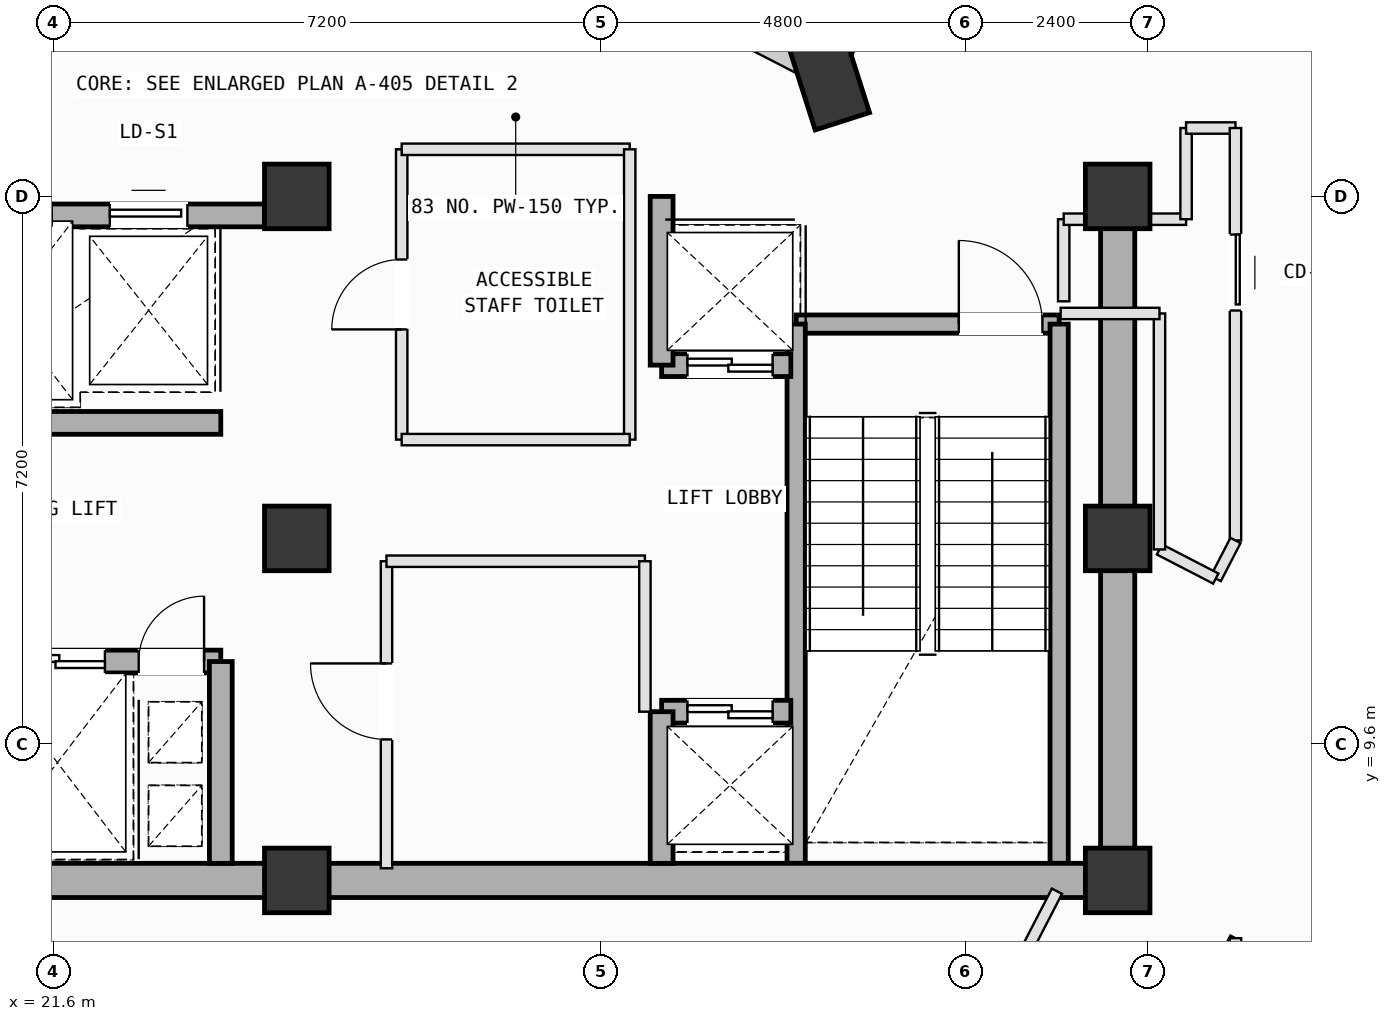
"""IFC4 building model, lengths in metres.
Left out: names, types, materials, properties, quantities, classifications, styles, units other than length and angle.
Written with IfcOpenShell. Run it as: python <this file> out.ifc"""

import sys

from ifc_helpers import new_model, si_unit, direction, frame, frame_2d, origin, origin_2d, place, context, subcontext, project, spatial, rectangle, extrude, element, fill, save


model = new_model("IFC4")
c1 = context("Model", 3, precision=1e-05, world=origin(), true_north=direction((0.0, 1.0)))
c2 = subcontext(c1, "Body", "Model", "MODEL_VIEW")
j1 = project(units=[si_unit("LENGTHUNIT", "METRE"), si_unit("PLANEANGLEUNIT", "RADIAN")], contexts=[c1])
p1 = place(None, origin())
s1 = spatial("IfcSite", under=j1, at=p1, CompositionType="ELEMENT")
p2 = place(p1, origin())
s2 = spatial("IfcBuilding", under=s1, at=p2, CompositionType="ELEMENT")
p3 = place(p2, frame((0.0, 0.0, 292.6)))
s3 = spatial("IfcBuildingStorey", under=s2, at=p3, CompositionType="ELEMENT", Elevation=292.6)
for number, where, z_axis, x_axis in (
    (1, (24.8, 7.8, 0.0), (0.0, 0.0, 1.0), (1.0, 0.0, 0.0)),
    (2, (24.8, 12.3, 0.0), (0.0, 0.0, 1.0), (1.0, 0.0, 0.0)),
    (3, (24.8, 16.8, 0.0), (0.0, 0.0, 1.0), (1.0, 0.0, 0.0)),
    (4, (35.6, 7.8, 0.0), (0.0, 0.0, 1.0), (1.0, 0.0, 0.0)),
    (5, (35.6, 12.3, 0.0), (0.0, 0.0, 1.0), (1.0, 0.0, 0.0)),
    (6, (35.6, 16.8, 0.0), (0.0, 0.0, 1.0), (1.0, 0.0, 0.0)),
):
    element("IfcColumn", number, at=place(p3, frame(where, z_axis=z_axis, x_axis=x_axis)), inside=s3, PredefinedType="COLUMN", context=c2, shape_type="SweptSolid", body=[
        extrude(rectangle(XDim=0.85, YDim=0.85, at=origin_2d()), origin(), (0.0, 0.0, 1.0), 4.0),
    ])
p4 = place(p3, frame((31.795, 18.36, 0.002), z_axis=(0.026747615739, -0.007267046285, 0.999615803742), x_axis=(-0.998694834125, -0.043719525929, 0.026405138601)))
e7 = element("IfcColumn", 7, at=p4, inside=s3, PredefinedType="COLUMN", context=c2, shape_type="SweptSolid", body=[
    extrude(rectangle(XDim=1.2, YDim=0.75, at=origin_2d()), origin(), (0.0, 0.0, 1.0), 3.998),
])
p5 = place(p3, frame((31.981, 18.721, 0.0), z_axis=(0.0, 0.0, 1.0), x_axis=(0.458658067714, 0.888612838598, 0.0)))
e8 = element("IfcWall", 8, at=p5, inside=s3, PredefinedType="SOLIDWALL", context=c2, shape_type="SweptSolid", body=[
    extrude(rectangle(XDim=6.158, YDim=0.28, at=frame_2d((3.079, 0.0))), origin(), (0.0, 0.0, 1.0), 3.265),
])
p6 = place(p5, frame((3.741, 0.0, 0.75)))
e9 = element("IfcOpeningElement", 9, at=p6, cuts=e8, PredefinedType="OPENING", context=c2, shape_type="SweptSolid", body=[
    extrude(rectangle(XDim=1.6, YDim=1.95, at=frame_2d((0.8, 0.975))), frame((0.0, 0.15, 0.0), z_axis=(0.0, -1.0, 0.0), x_axis=(1.0, 0.0, 0.0)), (0.0, 0.0, 1.0), 0.3),
])
p7 = place(p3, frame((25.308, 21.709, 0.0), z_axis=(0.0, 0.0, 1.0), x_axis=(0.888620195741, -0.458643813565, 0.0)))
e10 = element("IfcWall", 10, at=p7, inside=s3, PredefinedType="SOLIDWALL", context=c2, shape_type="SweptSolid", body=[
    extrude(rectangle(XDim=6.958, YDim=0.28, at=frame_2d((3.479, 0.0))), origin(), (0.0, 0.0, 1.0), 3.165),
])
p8 = place(p3, frame((31.37, 15.12, 0.0), z_axis=(0.0, 0.0, 1.0), x_axis=(1.0, 0.0, 0.0)))
e11 = element("IfcWall", 11, at=p8, inside=s3, PredefinedType="SOLIDWALL", context=c2, shape_type="SweptSolid", body=[
    extrude(rectangle(XDim=3.46, YDim=0.24, at=frame_2d((1.73, 0.0))), origin(), (0.0, 0.0, 1.0), 3.78),
])
p9 = place(p8, frame((2.14, 0.0, 0.0)))
e12 = element("IfcOpeningElement", 12, at=p9, cuts=e11, PredefinedType="OPENING", context=c2, shape_type="SweptSolid", body=[
    extrude(rectangle(XDim=1.1, YDim=2.15, at=frame_2d((0.55, 1.075))), frame((0.0, 0.13, 0.0), z_axis=(0.0, -1.0, 0.0), x_axis=(1.0, 0.0, 0.0)), (0.0, 0.0, 1.0), 0.26),
])
for number, where, z_axis, x_axis in (
    (13, (34.83, 15.12, 0.0), (0.0, 0.0, 1.0), (0.0, -1.0, 0.0)),
    (14, (31.37, 8.025, 0.0), (0.0, 0.0, 1.0), (0.0, 1.0, 0.0)),
):
    element("IfcWall", number, at=place(p3, frame(where, z_axis=z_axis, x_axis=x_axis)), inside=s3, PredefinedType="SOLIDWALL", context=c2, shape_type="SweptSolid", body=[
        extrude(rectangle(XDim=7.095, YDim=0.24, at=frame_2d((3.548, 0.0))), origin(), (0.0, 0.0, 1.0), 3.78),
    ])
for number, where, z_axis, x_axis in (
    (15, (14.0, 7.8, 0.0), (0.0, 0.0, 1.0), (1.0, 0.0, 0.0)),
    (16, (24.8, 7.8, 0.0), (0.0, 0.0, 1.0), (1.0, 0.0, 0.0)),
):
    element("IfcWall", number, at=place(p3, frame(where, z_axis=z_axis, x_axis=x_axis)), inside=s3, PredefinedType="SHEAR", context=c2, shape_type="SweptSolid", body=[
        extrude(rectangle(XDim=10.8, YDim=0.45, at=frame_2d((5.4, 0.0))), origin(), (0.0, 0.0, 1.0), 3.78),
    ])
p10 = place(p3, frame((35.6, 7.8, 0.0), z_axis=(0.0, 0.0, 1.0), x_axis=(0.0, 1.0, 0.0)))
e17 = element("IfcWall", 17, at=p10, inside=s3, PredefinedType="SHEAR", context=c2, shape_type="SweptSolid", body=[
    extrude(rectangle(XDim=9.0, YDim=0.45, at=frame_2d((4.5, 0.0))), origin(), (0.0, 0.0, 1.0), 3.78),
])
p11 = place(p3, frame((19.85, 16.55, 0.0), z_axis=(0.0, 0.0, 1.0), x_axis=(1.0, 0.0, 0.0)))
e18 = element("IfcWall", 18, at=p11, inside=s3, PredefinedType="SOLIDWALL", context=c2, shape_type="SweptSolid", body=[
    extrude(rectangle(XDim=4.525, YDim=0.3, at=frame_2d((2.262, 0.0))), origin(), (0.0, 0.0, 1.0), 3.78),
])
p12 = place(p11, frame((0.475, 0.0, 0.0)))
e19 = element("IfcOpeningElement", 19, at=p12, cuts=e18, PredefinedType="OPENING", context=c2, shape_type="SweptSolid", body=[
    extrude(rectangle(XDim=1.25, YDim=2.18, at=frame_2d((0.625, 1.09))), frame((0.0, 0.16, 0.0), z_axis=(0.0, -1.0, 0.0), x_axis=(1.0, 0.0, 0.0)), (0.0, 0.0, 1.0), 0.32),
])
p13 = place(p11, frame((2.49, 0.0, 0.0)))
e20 = element("IfcOpeningElement", 20, at=p13, cuts=e18, PredefinedType="OPENING", context=c2, shape_type="SweptSolid", body=[
    extrude(rectangle(XDim=1.02, YDim=2.12, at=frame_2d((0.51, 1.06))), frame((0.0, 0.16, 0.0), z_axis=(0.0, -1.0, 0.0), x_axis=(1.0, 0.0, 0.0)), (0.0, 0.0, 1.0), 0.32),
])
p14 = place(p3, frame((18.5, 10.68, 0.0), z_axis=(0.0, 0.0, 1.0), x_axis=(1.0, 0.0, 0.0)))
e21 = element("IfcWall", 21, at=p14, inside=s3, PredefinedType="SOLIDWALL", context=c2, shape_type="SweptSolid", body=[
    extrude(rectangle(XDim=5.3, YDim=0.3, at=frame_2d((2.65, 0.0))), origin(), (0.0, 0.0, 1.0), 3.78),
])
p15 = place(p14, frame((4.22, 0.0, 0.0)))
e22 = element("IfcOpeningElement", 22, at=p15, cuts=e21, PredefinedType="OPENING", context=c2, shape_type="SweptSolid", body=[
    extrude(rectangle(XDim=0.86, YDim=2.06, at=frame_2d((0.43, 1.03))), frame((0.0, 0.16, 0.0), z_axis=(0.0, -1.0, 0.0), x_axis=(1.0, 0.0, 0.0)), (0.0, 0.0, 1.0), 0.32),
])
p16 = place(p14, frame((0.425, 0.0, 0.0)))
e23 = element("IfcOpeningElement", 23, at=p16, cuts=e21, PredefinedType="OPENING", context=c2, shape_type="SweptSolid", body=[
    extrude(rectangle(XDim=1.25, YDim=2.18, at=frame_2d((0.625, 1.09))), frame((0.0, 0.16, 0.0), z_axis=(0.0, -1.0, 0.0), x_axis=(1.0, 0.0, 0.0)), (0.0, 0.0, 1.0), 0.32),
])
p17 = place(p14, frame((2.525, 0.0, 0.0)))
e24 = element("IfcOpeningElement", 24, at=p17, cuts=e21, PredefinedType="OPENING", context=c2, shape_type="SweptSolid", body=[
    extrude(rectangle(XDim=1.25, YDim=2.18, at=frame_2d((0.625, 1.09))), frame((0.0, 0.16, 0.0), z_axis=(0.0, -1.0, 0.0), x_axis=(1.0, 0.0, 0.0)), (0.0, 0.0, 1.0), 0.32),
])
p18 = place(p3, frame((18.5, 13.82, 0.0), z_axis=(0.0, 0.0, 1.0), x_axis=(1.0, 0.0, 0.0)))
e25 = element("IfcWall", 25, at=p18, inside=s3, PredefinedType="SOLIDWALL", context=c2, shape_type="SweptSolid", body=[
    extrude(rectangle(XDim=5.3, YDim=0.3, at=frame_2d((2.65, 0.0))), origin(), (0.0, 0.0, 1.0), 3.78),
])
p19 = place(p18, frame((0.18, 0.0, 0.0)))
e26 = element("IfcOpeningElement", 26, at=p19, cuts=e25, PredefinedType="OPENING", context=c2, shape_type="SweptSolid", body=[
    extrude(rectangle(XDim=1.1, YDim=2.15, at=frame_2d((0.55, 1.075))), frame((0.0, 0.16, 0.0), z_axis=(0.0, -1.0, 0.0), x_axis=(1.0, 0.0, 0.0)), (0.0, 0.0, 1.0), 0.32),
])
p20 = place(p3, frame((23.8, 8.025, 0.0), z_axis=(0.0, 0.0, 1.0), x_axis=(0.0, 1.0, 0.0)))
e27 = element("IfcWall", 27, at=p20, inside=s3, PredefinedType="SOLIDWALL", context=c2, shape_type="SweptSolid", body=[
    extrude(rectangle(XDim=2.655, YDim=0.3, at=frame_2d((1.328, 0.0))), origin(), (0.0, 0.0, 1.0), 3.78),
])
p21 = place(p3, frame((29.6, 10.02, 0.0), z_axis=(0.0, 0.0, 1.0), x_axis=(1.0, 0.0, 0.0)))
e28 = element("IfcWall", 28, at=p21, inside=s3, PredefinedType="SOLIDWALL", context=c2, shape_type="SweptSolid", body=[
    extrude(rectangle(XDim=1.7, YDim=0.3, at=frame_2d((0.85, 0.0))), origin(), (0.0, 0.0, 1.0), 3.78),
])
p22 = place(p21, frame((0.34, 0.0, 0.0)))
e29 = element("IfcOpeningElement", 29, at=p22, cuts=e28, PredefinedType="OPENING", context=c2, shape_type="SweptSolid", body=[
    extrude(rectangle(XDim=1.12, YDim=2.15, at=frame_2d((0.56, 1.075))), frame((0.0, 0.16, 0.0), z_axis=(0.0, -1.0, 0.0), x_axis=(1.0, 0.0, 0.0)), (0.0, 0.0, 1.0), 0.32),
])
p23 = place(p3, frame((29.6, 8.025, 0.0), z_axis=(0.0, 0.0, 1.0), x_axis=(0.0, 1.0, 0.0)))
e30 = element("IfcWall", 30, at=p23, inside=s3, PredefinedType="SOLIDWALL", context=c2, shape_type="SweptSolid", body=[
    extrude(rectangle(XDim=1.995, YDim=0.3, at=frame_2d((0.998, 0.0))), origin(), (0.0, 0.0, 1.0), 3.78),
])
p24 = place(p3, frame((29.6, 14.58, 0.0), z_axis=(0.0, 0.0, 1.0), x_axis=(1.0, 0.0, 0.0)))
e31 = element("IfcWall", 31, at=p24, inside=s3, PredefinedType="SOLIDWALL", context=c2, shape_type="SweptSolid", body=[
    extrude(rectangle(XDim=1.7, YDim=0.3, at=frame_2d((0.85, 0.0))), origin(), (0.0, 0.0, 1.0), 3.78),
])
p25 = place(p24, frame((0.34, 0.0, 0.0)))
e32 = element("IfcOpeningElement", 32, at=p25, cuts=e31, PredefinedType="OPENING", context=c2, shape_type="SweptSolid", body=[
    extrude(rectangle(XDim=1.12, YDim=2.15, at=frame_2d((0.56, 1.075))), frame((0.0, 0.16, 0.0), z_axis=(0.0, -1.0, 0.0), x_axis=(1.0, 0.0, 0.0)), (0.0, 0.0, 1.0), 0.32),
])
p26 = place(p3, frame((29.6, 14.58, 0.0), z_axis=(0.0, 0.0, 1.0), x_axis=(0.0, 1.0, 0.0)))
e33 = element("IfcWall", 33, at=p26, inside=s3, PredefinedType="SOLIDWALL", context=c2, shape_type="SweptSolid", body=[
    extrude(rectangle(XDim=2.22, YDim=0.3, at=frame_2d((1.11, 0.0))), origin(), (0.0, 0.0, 1.0), 3.78),
])
p27 = place(p3, frame((25.98, 7.96, 0.0), z_axis=(0.0, 0.0, 1.0), x_axis=(0.0, 1.0, 0.0)))
e34 = element("IfcWall", 34, at=p27, inside=s3, PredefinedType="PARTITIONING", context=c2, shape_type="SweptSolid", body=[
    extrude(rectangle(XDim=4.04, YDim=0.15, at=frame_2d((2.02, 0.0))), origin(), (0.0, 0.0, 1.0), 3.78),
])
p28 = place(p27, frame((1.695, 0.0, 0.0)))
e35 = element("IfcOpeningElement", 35, at=p28, cuts=e34, PredefinedType="OPENING", context=c2, shape_type="SweptSolid", body=[
    extrude(rectangle(XDim=1.0, YDim=2.12, at=frame_2d((0.5, 1.06))), frame((0.0, 0.085, 0.0), z_axis=(0.0, -1.0, 0.0), x_axis=(1.0, 0.0, 0.0)), (0.0, 0.0, 1.0), 0.17),
])
p29 = place(p3, frame((25.98, 12.0, 0.0), z_axis=(0.0, 0.0, 1.0), x_axis=(1.0, 0.0, 0.0)))
e36 = element("IfcWall", 36, at=p29, inside=s3, PredefinedType="PARTITIONING", context=c2, shape_type="SweptSolid", body=[
    extrude(rectangle(XDim=3.4, YDim=0.15, at=frame_2d((1.7, 0.0))), origin(), (0.0, 0.0, 1.0), 3.78),
])
p30 = place(p3, frame((29.38, 12.0, 0.0), z_axis=(0.0, 0.0, 1.0), x_axis=(0.0, -1.0, 0.0)))
e37 = element("IfcWall", 37, at=p30, inside=s3, PredefinedType="PARTITIONING", context=c2, shape_type="SweptSolid", body=[
    extrude(rectangle(XDim=1.98, YDim=0.15, at=frame_2d((0.99, 0.0))), origin(), (0.0, 0.0, 1.0), 3.78),
])
p31 = place(p3, frame((26.18, 13.6, 0.0), z_axis=(0.0, 0.0, 1.0), x_axis=(0.0, 1.0, 0.0)))
e38 = element("IfcWall", 38, at=p31, inside=s3, PredefinedType="PARTITIONING", context=c2, shape_type="SweptSolid", body=[
    extrude(rectangle(XDim=3.82, YDim=0.15, at=frame_2d((1.91, 0.0))), origin(), (0.0, 0.0, 1.0), 3.78),
])
p32 = place(p31, frame((1.45, 0.0, 0.0)))
e39 = element("IfcOpeningElement", 39, at=p32, cuts=e38, PredefinedType="OPENING", context=c2, shape_type="SweptSolid", body=[
    extrude(rectangle(XDim=0.92, YDim=2.1, at=frame_2d((0.46, 1.05))), frame((0.0, 0.085, 0.0), z_axis=(0.0, -1.0, 0.0), x_axis=(1.0, 0.0, 0.0)), (0.0, 0.0, 1.0), 0.17),
])
p33 = place(p3, frame((26.18, 17.42, 0.0), z_axis=(0.0, 0.0, 1.0), x_axis=(1.0, 0.0, 0.0)))
e40 = element("IfcWall", 40, at=p33, inside=s3, PredefinedType="PARTITIONING", context=c2, shape_type="SweptSolid", body=[
    extrude(rectangle(XDim=3.0, YDim=0.15, at=frame_2d((1.5, 0.0))), origin(), (0.0, 0.0, 1.0), 3.78),
])
p34 = place(p3, frame((29.18, 17.42, 0.0), z_axis=(0.0, 0.0, 1.0), x_axis=(0.0, -1.0, 0.0)))
e41 = element("IfcWall", 41, at=p34, inside=s3, PredefinedType="PARTITIONING", context=c2, shape_type="SweptSolid", body=[
    extrude(rectangle(XDim=3.82, YDim=0.15, at=frame_2d((1.91, 0.0))), origin(), (0.0, 0.0, 1.0), 3.78),
])
p35 = place(p3, frame((29.18, 13.6, 0.0), z_axis=(0.0, 0.0, 1.0), x_axis=(-1.0, 0.0, 0.0)))
e42 = element("IfcWall", 42, at=p35, inside=s3, PredefinedType="PARTITIONING", context=c2, shape_type="SweptSolid", body=[
    extrude(rectangle(XDim=3.0, YDim=0.15, at=frame_2d((1.5, 0.0))), origin(), (0.0, 0.0, 1.0), 3.78),
])
p36 = place(p3, frame((35.294, 3.444, 0.0), z_axis=(0.0, 0.0, 1.0), x_axis=(0.458639846184, 0.888622243415, 0.0)))
e43 = element("IfcWall", 43, at=p36, inside=s3, PredefinedType="PARTITIONING", context=c2, shape_type="SweptSolid", body=[
    extrude(rectangle(XDim=4.047, YDim=0.15, at=frame_2d((2.023, 0.0))), origin(), (0.0, 0.0, 1.0), 3.78),
])
p37 = place(p3, frame((37.15, 7.04, 0.0), z_axis=(0.0, 0.0, 1.0), x_axis=(0.0, -1.0, 0.0)))
e44 = element("IfcWall", 44, at=p37, inside=s3, PredefinedType="PARTITIONING", context=c2, shape_type="SweptSolid", body=[
    extrude(rectangle(XDim=1.843, YDim=0.15, at=frame_2d((0.921, 0.0))), origin(), (0.0, 0.0, 1.0), 3.78),
])
p38 = place(p3, frame((34.89, 15.42, 0.0), z_axis=(0.0, 0.0, 1.0), x_axis=(0.0, 1.0, 0.0)))
e45 = element("IfcWall", 45, at=p38, inside=s3, PredefinedType="PARTITIONING", context=c2, shape_type="SweptSolid", body=[
    extrude(rectangle(XDim=1.08, YDim=0.15, at=frame_2d((0.54, 0.0))), origin(), (0.0, 0.0, 1.0), 3.78),
])
p39 = place(p3, frame((34.89, 16.5, 0.0), z_axis=(0.0, 0.0, 1.0), x_axis=(1.0, 0.0, 0.0)))
e46 = element("IfcWall", 46, at=p39, inside=s3, PredefinedType="PARTITIONING", context=c2, shape_type="SweptSolid", body=[
    extrude(rectangle(XDim=1.61, YDim=0.15, at=frame_2d((0.805, 0.0))), origin(), (0.0, 0.0, 1.0), 3.165),
])
p40 = place(p3, frame((36.5, 16.5, 0.0), z_axis=(0.0, 0.0, 1.0), x_axis=(0.0, 1.0, 0.0)))
e47 = element("IfcWall", 47, at=p40, inside=s3, PredefinedType="PARTITIONING", context=c2, shape_type="SweptSolid", body=[
    extrude(rectangle(XDim=1.2, YDim=0.15, at=frame_2d((0.6, 0.0))), origin(), (0.0, 0.0, 1.0), 3.78),
])
p41 = place(p3, frame((36.5, 17.7, 0.0), z_axis=(0.0, 0.0, 1.0), x_axis=(1.0, 0.0, 0.0)))
e48 = element("IfcWall", 48, at=p41, inside=s3, PredefinedType="PARTITIONING", context=c2, shape_type="SweptSolid", body=[
    extrude(rectangle(XDim=0.65, YDim=0.15, at=frame_2d((0.325, 0.0))), origin(), (0.0, 0.0, 1.0), 3.78),
])
p42 = place(p3, frame((37.15, 17.7, 0.0), z_axis=(0.0, 0.0, 1.0), x_axis=(0.0, -1.0, 0.0)))
e49 = element("IfcWall", 49, at=p42, inside=s3, PredefinedType="PARTITIONING", context=c2, shape_type="SweptSolid", body=[
    extrude(rectangle(XDim=5.427, YDim=0.15, at=frame_2d((2.713, 0.0))), origin(), (0.0, 0.0, 1.0), 3.78),
])
p43 = place(p42, frame((1.401, 0.0, 0.0)))
e50 = element("IfcOpeningElement", 50, at=p43, cuts=e49, PredefinedType="OPENING", context=c2, shape_type="SweptSolid", body=[
    extrude(rectangle(XDim=1.0, YDim=2.12, at=frame_2d((0.5, 1.06))), frame((0.0, 0.085, 0.0), z_axis=(0.0, -1.0, 0.0), x_axis=(1.0, 0.0, 0.0)), (0.0, 0.0, 1.0), 0.17),
])
p44 = place(p3, frame((37.15, 12.273, 0.0), z_axis=(0.0, 0.0, 1.0), x_axis=(-0.458951701301, -0.88846121799, 0.0)))
e51 = element("IfcWall", 51, at=p44, inside=s3, PredefinedType="PARTITIONING", context=c2, shape_type="SweptSolid", body=[
    extrude(rectangle(XDim=0.564, YDim=0.15, at=frame_2d((0.282, 0.0))), origin(), (0.0, 0.0, 1.0), 3.78),
])
p45 = place(p3, frame((36.891, 11.772, 0.0), z_axis=(0.0, 0.0, 1.0), x_axis=(-0.888378170126, 0.459112433771, 0.0)))
e52 = element("IfcWall", 52, at=p45, inside=s3, PredefinedType="PARTITIONING", context=c2, shape_type="SweptSolid", body=[
    extrude(rectangle(XDim=0.834, YDim=0.15, at=frame_2d((0.417, 0.0))), origin(), (0.0, 0.0, 1.0), 3.78),
])
p46 = place(p3, frame((36.15, 12.155, 0.0), z_axis=(0.0, 0.0, 1.0), x_axis=(0.0, 1.0, 0.0)))
e53 = element("IfcWall", 53, at=p46, inside=s3, PredefinedType="PARTITIONING", context=c2, shape_type="SweptSolid", body=[
    extrude(rectangle(XDim=3.105, YDim=0.15, at=frame_2d((1.552, 0.0))), origin(), (0.0, 0.0, 1.0), 3.78),
])
p47 = place(p3, frame((36.15, 15.26, 0.0), z_axis=(0.0, 0.0, 1.0), x_axis=(-1.0, 0.0, 0.0)))
e54 = element("IfcWall", 54, at=p47, inside=s3, PredefinedType="PARTITIONING", context=c2, shape_type="SweptSolid", body=[
    extrude(rectangle(XDim=1.3, YDim=0.15, at=frame_2d((0.65, 0.0))), origin(), (0.0, 0.0, 1.0), 3.78),
])
p48 = place(p3, frame((34.801, 7.658, 0.0), z_axis=(0.0, 0.0, 1.0), x_axis=(-0.458441484691, -0.888724594638, 0.0)))
e55 = element("IfcWall", 55, at=p48, inside=s3, PredefinedType="PARTITIONING", context=c2, shape_type="SweptSolid", body=[
    extrude(rectangle(XDim=3.798, YDim=0.15, at=frame_2d((1.899, 0.0))), origin(), (0.0, 0.0, 1.0), 3.78),
])
p49 = place(p9, origin())
e56 = element("IfcDoor", 56, at=p49, inside=s3, OperationType="SINGLE_SWING_LEFT", PredefinedType="DOOR", context=c2, shape_type="SweptSolid", body=[
    extrude(rectangle(XDim=1.1, YDim=2.15, at=frame_2d((0.55, 1.075))), frame((0.0, 0.025, 0.0), z_axis=(0.0, -1.0, 0.0), x_axis=(1.0, 0.0, 0.0)), (0.0, 0.0, 1.0), 0.05),
])
fill(e12, e56)
p50 = place(p15, origin())
e57 = element("IfcDoor", 57, at=p50, inside=s3, OperationType="SINGLE_SWING_RIGHT", PredefinedType="DOOR", context=c2, shape_type="SweptSolid", body=[
    extrude(rectangle(XDim=0.86, YDim=2.06, at=frame_2d((0.43, 1.03))), frame((0.0, 0.025, 0.0), z_axis=(0.0, -1.0, 0.0), x_axis=(1.0, 0.0, 0.0)), (0.0, 0.0, 1.0), 0.05),
])
fill(e22, e57)
p51 = place(p17, origin())
e58 = element("IfcDoor", 58, at=p51, inside=s3, OperationType="DOUBLE_DOOR_SLIDING", PredefinedType="DOOR", context=c2, shape_type="SweptSolid", body=[
    extrude(rectangle(XDim=1.25, YDim=2.18, at=frame_2d((0.625, 1.09))), frame((0.0, 0.025, 0.0), z_axis=(0.0, -1.0, 0.0), x_axis=(1.0, 0.0, 0.0)), (0.0, 0.0, 1.0), 0.05),
])
fill(e24, e58)
p52 = place(p22, origin())
e59 = element("IfcDoor", 59, at=p52, inside=s3, OperationType="DOUBLE_DOOR_SLIDING", PredefinedType="DOOR", context=c2, shape_type="SweptSolid", body=[
    extrude(rectangle(XDim=1.12, YDim=2.15, at=frame_2d((0.56, 1.075))), frame((0.0, 0.025, 0.0), z_axis=(0.0, -1.0, 0.0), x_axis=(1.0, 0.0, 0.0)), (0.0, 0.0, 1.0), 0.05),
])
fill(e29, e59)
p53 = place(p25, origin())
e60 = element("IfcDoor", 60, at=p53, inside=s3, OperationType="DOUBLE_DOOR_SLIDING", PredefinedType="DOOR", context=c2, shape_type="SweptSolid", body=[
    extrude(rectangle(XDim=1.12, YDim=2.15, at=frame_2d((0.56, 1.075))), frame((0.0, 0.025, 0.0), z_axis=(0.0, -1.0, 0.0), x_axis=(1.0, 0.0, 0.0)), (0.0, 0.0, 1.0), 0.05),
])
fill(e32, e60)
p54 = place(p13, origin())
e61 = element("IfcDoor", 61, at=p54, inside=s3, OperationType="SLIDING_TO_LEFT", PredefinedType="DOOR", context=c2, shape_type="SweptSolid", body=[
    extrude(rectangle(XDim=1.02, YDim=2.12, at=frame_2d((0.51, 1.06))), frame((0.0, 0.025, 0.0), z_axis=(0.0, -1.0, 0.0), x_axis=(1.0, 0.0, 0.0)), (0.0, 0.0, 1.0), 0.05),
])
fill(e20, e61)
p55 = place(p28, origin())
e62 = element("IfcDoor", 62, at=p55, inside=s3, OperationType="SINGLE_SWING_RIGHT", PredefinedType="DOOR", context=c2, shape_type="SweptSolid", body=[
    extrude(rectangle(XDim=1.0, YDim=2.12, at=frame_2d((0.5, 1.06))), frame((0.0, 0.025, 0.0), z_axis=(0.0, -1.0, 0.0), x_axis=(1.0, 0.0, 0.0)), (0.0, 0.0, 1.0), 0.05),
])
fill(e35, e62)
p56 = place(p32, origin())
e63 = element("IfcDoor", 63, at=p56, inside=s3, OperationType="SINGLE_SWING_LEFT", PredefinedType="DOOR", context=c2, shape_type="SweptSolid", body=[
    extrude(rectangle(XDim=0.92, YDim=2.1, at=frame_2d((0.46, 1.05))), frame((0.0, 0.025, 0.0), z_axis=(0.0, -1.0, 0.0), x_axis=(1.0, 0.0, 0.0)), (0.0, 0.0, 1.0), 0.05),
])
fill(e39, e63)
p57 = place(p43, origin())
e64 = element("IfcDoor", 64, at=p57, inside=s3, OperationType="SLIDING_TO_LEFT", PredefinedType="DOOR", context=c2, shape_type="SweptSolid", body=[
    extrude(rectangle(XDim=1.0, YDim=2.12, at=frame_2d((0.5, 1.06))), frame((0.0, 0.025, 0.0), z_axis=(0.0, -1.0, 0.0), x_axis=(1.0, 0.0, 0.0)), (0.0, 0.0, 1.0), 0.05),
])
fill(e50, e64)
save(model, sys.argv[1])
